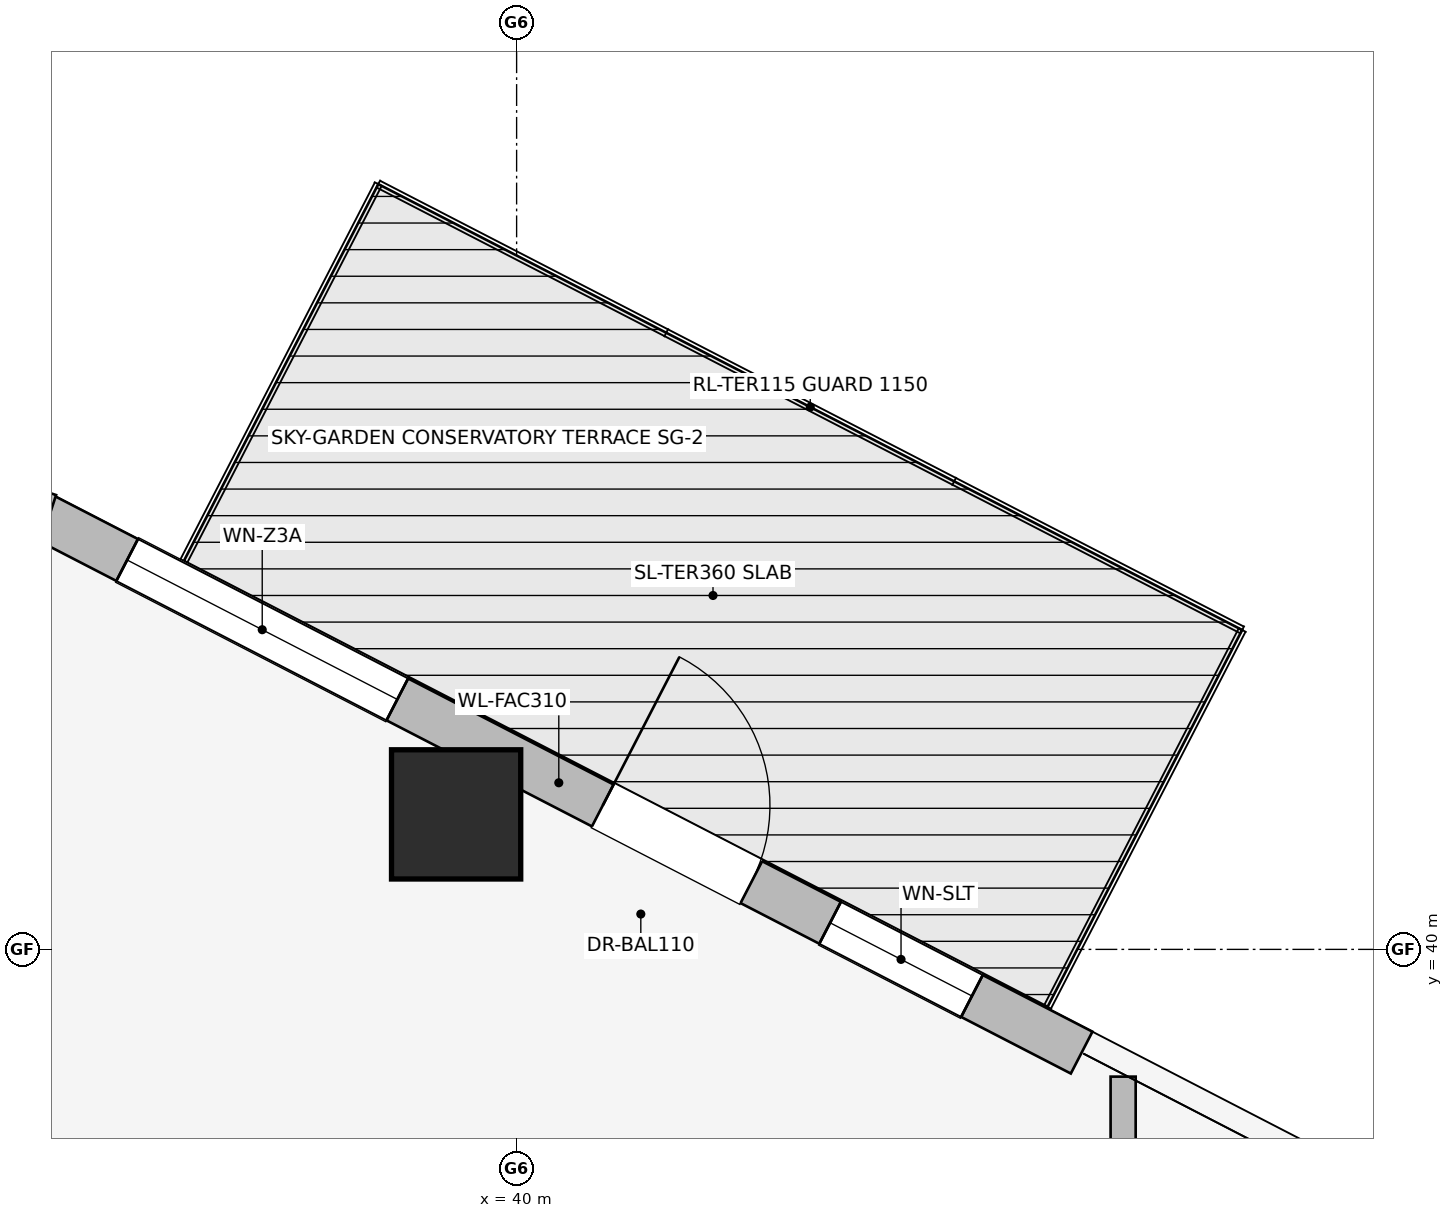
"""IFC4 building model, lengths in metres.
Left out: names, types, materials, properties, quantities, classifications, styles, units other than length and angle.
Written with IfcOpenShell. Run it as: python <this file> out.ifc"""

import sys

from ifc_helpers import new_model, si_unit, direction, frame, frame_2d, origin, origin_2d, place, context, subcontext, project, spatial, rectangle, extrude, element, fill, save


model = new_model("IFC4")
c1 = context("Model", 3, precision=1e-05, world=origin(), true_north=direction((0.0, 1.0)))
c2 = subcontext(c1, "Body", "Model", "MODEL_VIEW")
j1 = project(units=[si_unit("LENGTHUNIT", "METRE"), si_unit("PLANEANGLEUNIT", "RADIAN")], contexts=[c1])
p1 = place(None, origin())
s1 = spatial("IfcSite", under=j1, at=p1, CompositionType="ELEMENT")
p2 = place(p1, origin())
s2 = spatial("IfcBuilding", under=s1, at=p2, CompositionType="ELEMENT")
p3 = place(p2, frame((0.0, 0.0, 163.65)))
s3 = spatial("IfcBuildingStorey", under=s2, at=p3, CompositionType="ELEMENT", Elevation=163.65)
p4 = place(p3, frame((39.602, 40.888, 0.0), z_axis=(0.0, 0.0, 1.0), x_axis=(1.0, 0.0, 0.0)))
e1 = element("IfcColumn", 1, at=p4, inside=s3, PredefinedType="COLUMN", context=c2, shape_type="SweptSolid", body=[
    extrude(rectangle(XDim=0.85, YDim=0.85, at=origin_2d()), origin(), (0.0, 0.0, 1.0), 3.45),
])
p5 = place(p3, frame((36.838, 42.871, 0.0), z_axis=(0.0, 0.0, 1.0), x_axis=(0.888645948291, -0.458593914686, 0.0)))
e2 = element("IfcWall", 2, at=p5, inside=s3, PredefinedType="STANDARD", context=c2, shape_type="SweptSolid", body=[
    extrude(rectangle(XDim=7.741, YDim=0.31, at=frame_2d((3.871, 0.0))), origin(), (0.0, 0.0, 1.0), 3.19),
])
p6 = place(p5, frame((4.196, 0.0, 0.0)))
e3 = element("IfcOpeningElement", 3, at=p6, cuts=e2, PredefinedType="OPENING", context=c2, shape_type="SweptSolid", body=[
    extrude(rectangle(XDim=1.1, YDim=2.04, at=frame_2d((0.55, 1.02))), frame((0.0, 0.165, 0.0), z_axis=(0.0, -1.0, 0.0), x_axis=(1.0, 0.0, 0.0)), (0.0, 0.0, 1.0), 0.33),
])
p7 = place(p5, frame((0.675, 0.0, 0.75)))
e4 = element("IfcOpeningElement", 4, at=p7, cuts=e2, PredefinedType="OPENING", context=c2, shape_type="SweptSolid", body=[
    extrude(rectangle(XDim=2.0, YDim=1.5, at=frame_2d((1.0, 0.75))), frame((0.0, 0.165, 0.0), z_axis=(0.0, -1.0, 0.0), x_axis=(1.0, 0.0, 0.0)), (0.0, 0.0, 1.0), 0.33),
])
p8 = place(p5, frame((5.879, 0.0, 0.75)))
e5 = element("IfcOpeningElement", 5, at=p8, cuts=e2, PredefinedType="OPENING", context=c2, shape_type="SweptSolid", body=[
    extrude(rectangle(XDim=1.05, YDim=1.4, at=frame_2d((0.525, 0.7))), frame((0.0, 0.165, 0.0), z_axis=(0.0, -1.0, 0.0), x_axis=(1.0, 0.0, 0.0)), (0.0, 0.0, 1.0), 0.33),
])
p9 = place(p3, frame((35.283, 43.37, 0.0), z_axis=(0.0, 0.0, 1.0), x_axis=(0.949937416267, -0.312440242569, 0.0)))
e6 = element("IfcWall", 6, at=p9, inside=s3, PredefinedType="STANDARD", context=c2, shape_type="SweptSolid", body=[
    extrude(rectangle(XDim=1.722, YDim=0.33, at=frame_2d((0.861, 0.0))), origin(), (0.0, 0.0, 1.0), 3.19),
])
p10 = place(p9, frame((0.336, 0.0, 0.75)))
e7 = element("IfcOpeningElement", 7, at=p10, cuts=e6, PredefinedType="OPENING", context=c2, shape_type="SweptSolid", body=[
    extrude(rectangle(XDim=1.05, YDim=1.4, at=frame_2d((0.525, 0.7))), frame((0.0, 0.175, 0.0), z_axis=(0.0, -1.0, 0.0), x_axis=(1.0, 0.0, 0.0)), (0.0, 0.0, 1.0), 0.35),
])
p11 = place(p3, frame((43.99, 31.97, 0.0), z_axis=(0.0, 0.0, 1.0), x_axis=(0.0, 1.0, 0.0)))
e8 = element("IfcWall", 8, at=p11, inside=s3, PredefinedType="PARTITIONING", context=c2, shape_type="SweptSolid", body=[
    extrude(rectangle(XDim=7.193, YDim=0.165, at=frame_2d((3.597, 0.0))), origin(), (0.0, 0.0, 1.0), 3.19),
])
p12 = place(p6, origin())
e9 = element("IfcDoor", 9, at=p12, inside=s3, OperationType="SINGLE_SWING_LEFT", PredefinedType="DOOR", context=c2, shape_type="SweptSolid", body=[
    extrude(rectangle(XDim=1.1, YDim=2.04, at=frame_2d((0.55, 1.02))), frame((0.0, 0.025, 0.0), z_axis=(0.0, -1.0, 0.0), x_axis=(1.0, 0.0, 0.0)), (0.0, 0.0, 1.0), 0.05),
])
fill(e3, e9)
p13 = place(p7, origin())
e10 = element("IfcWindow", 10, at=p13, inside=s3, PartitioningType="SINGLE_PANEL", PredefinedType="WINDOW", context=c2, shape_type="SweptSolid", body=[
    extrude(rectangle(XDim=2.0, YDim=1.5, at=frame_2d((1.0, 0.75))), frame((0.0, 0.03, 0.0), z_axis=(0.0, -1.0, 0.0), x_axis=(1.0, 0.0, 0.0)), (0.0, 0.0, 1.0), 0.06),
])
fill(e4, e10)
p14 = place(p8, origin())
e11 = element("IfcWindow", 11, at=p14, inside=s3, PartitioningType="SINGLE_PANEL", PredefinedType="WINDOW", context=c2, shape_type="SweptSolid", body=[
    extrude(rectangle(XDim=1.05, YDim=1.4, at=frame_2d((0.525, 0.7))), frame((0.0, 0.03, 0.0), z_axis=(0.0, -1.0, 0.0), x_axis=(1.0, 0.0, 0.0)), (0.0, 0.0, 1.0), 0.06),
])
fill(e5, e11)
save(model, sys.argv[1])
